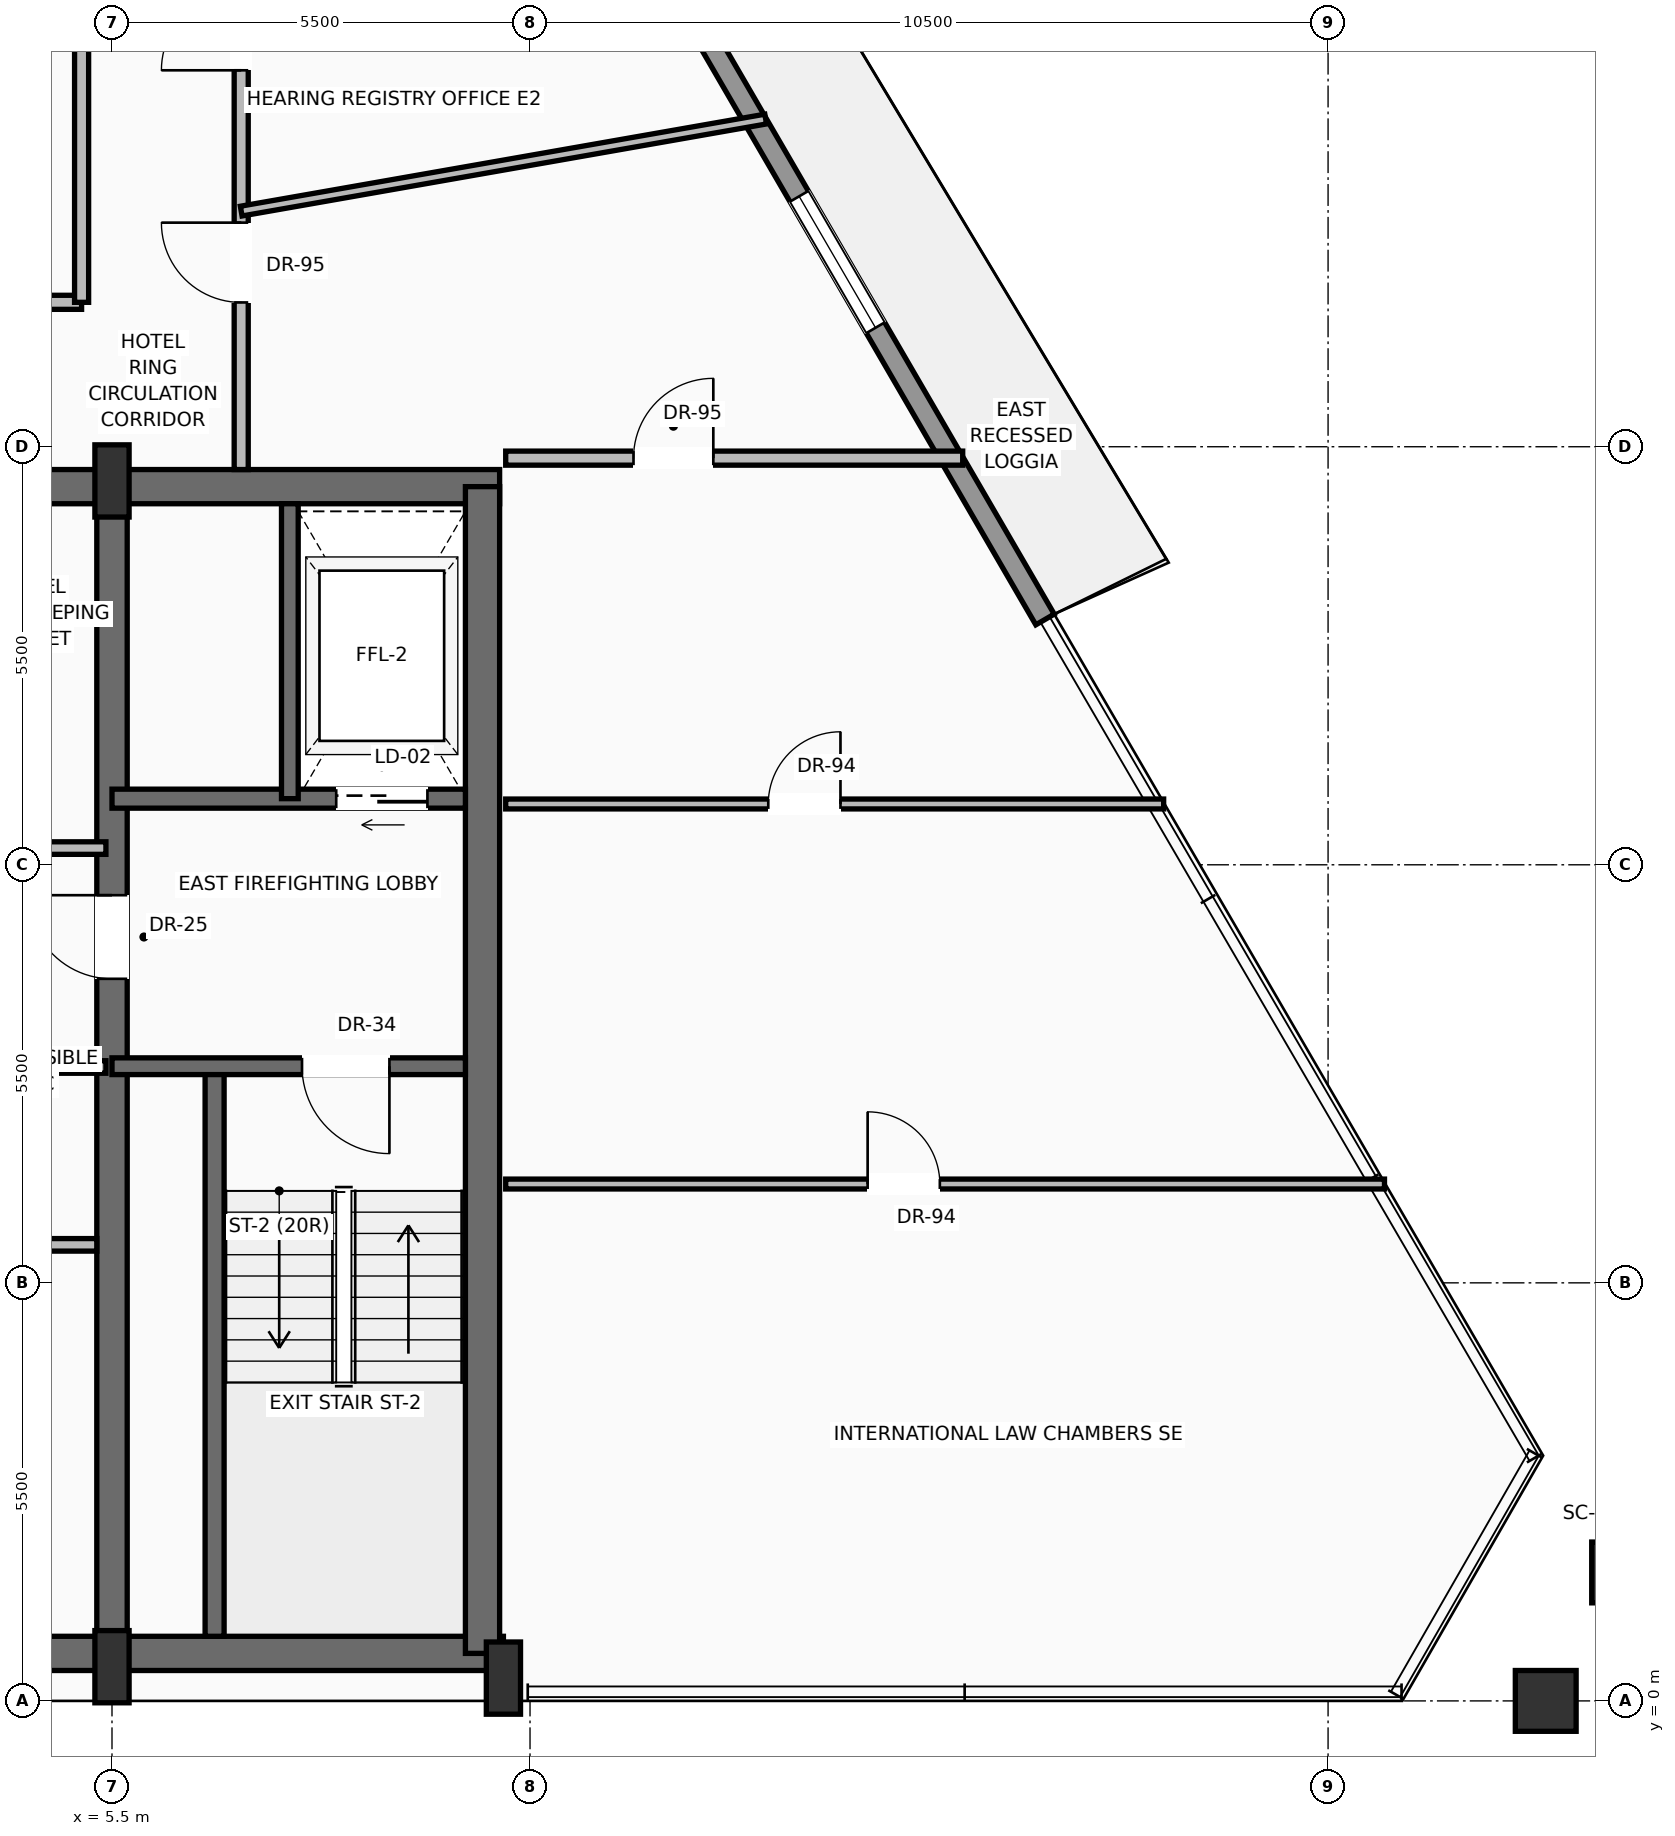
"""IFC4 building model, lengths in metres.
Left out: names, types, materials, properties, quantities, classifications, styles, units other than length and angle.
Written with IfcOpenShell. Run it as: python <this file> out.ifc"""

import sys

from ifc_helpers import new_model, si_unit, direction, frame, frame_2d, origin, origin_2d, place, context, subcontext, project, spatial, rectangle, hollow_rectangle, extrude, source, transform, mapped, element, fill, save


model = new_model("IFC4")
c1 = context("Model", 3, precision=1e-05, world=origin(), true_north=direction((0.0, 1.0)))
c2 = subcontext(c1, "Body", "Model", "MODEL_VIEW")
j1 = project(units=[si_unit("LENGTHUNIT", "METRE"), si_unit("PLANEANGLEUNIT", "RADIAN")], contexts=[c1])
p1 = place(None, origin())
s1 = spatial("IfcSite", under=j1, at=p1, CompositionType="ELEMENT")
p2 = place(p1, origin())
s2 = spatial("IfcBuilding", under=s1, at=p2, CompositionType="ELEMENT")
p3 = place(p2, frame((0.0, 0.0, 290.25)))
s3 = spatial("IfcBuildingStorey", under=s2, at=p3, CompositionType="ELEMENT", Elevation=290.25)
p4 = place(p3, frame((-10.65, 0.625, 0.0), z_axis=(0.0, 0.0, 1.0), x_axis=(1.0, 0.0, 0.0)))
e1 = element("IfcWall", 1, at=p4, inside=s3, PredefinedType="SHEAR", context=c2, shape_type="SweptSolid", body=[
    extrude(rectangle(XDim=21.3, YDim=0.45, at=frame_2d((10.65, 0.0))), origin(), (0.0, 0.0, 1.0), 3.24),
])
p5 = place(p3, frame((-10.6, 15.975, 0.0), z_axis=(0.0, 0.0, 1.0), x_axis=(1.0, 0.0, 0.0)))
e2 = element("IfcWall", 2, at=p5, inside=s3, PredefinedType="SHEAR", context=c2, shape_type="SweptSolid", body=[
    extrude(rectangle(XDim=21.2, YDim=0.45, at=frame_2d((10.6, 0.0))), origin(), (0.0, 0.0, 1.0), 3.24),
])
p6 = place(p5, frame((3.17, 0.0, 0.0)))
e3 = element("IfcOpeningElement", 3, at=p6, cuts=e2, PredefinedType="OPENING", context=c2, shape_type="SweptSolid", body=[
    extrude(rectangle(XDim=1.3, YDim=2.3, at=frame_2d((0.65, 1.15))), frame((0.0, 0.235, 0.0), z_axis=(0.0, -1.0, 0.0), x_axis=(1.0, 0.0, 0.0)), (0.0, 0.0, 1.0), 0.47),
])
p7 = place(p5, frame((9.6, 0.0, 0.0)))
e4 = element("IfcOpeningElement", 4, at=p7, cuts=e2, PredefinedType="OPENING", context=c2, shape_type="SweptSolid", body=[
    extrude(rectangle(XDim=2.0, YDim=2.4, at=frame_2d((1.0, 1.2))), frame((0.0, 0.235, 0.0), z_axis=(0.0, -1.0, 0.0), x_axis=(1.0, 0.0, 0.0)), (0.0, 0.0, 1.0), 0.47),
])
p8 = place(p3, frame((10.375, 0.625, 0.0), z_axis=(0.0, 0.0, 1.0), x_axis=(0.0, 1.0, 0.0)))
e5 = element("IfcWall", 5, at=p8, inside=s3, PredefinedType="SHEAR", context=c2, shape_type="SweptSolid", body=[
    extrude(rectangle(XDim=15.35, YDim=0.45, at=frame_2d((7.675, 0.0))), origin(), (0.0, 0.0, 1.0), 3.24),
])
p9 = place(p3, frame((5.5, 0.625, 0.0), z_axis=(0.0, 0.0, 1.0), x_axis=(0.0, 1.0, 0.0)))
e6 = element("IfcWall", 6, at=p9, inside=s3, PredefinedType="SHEAR", context=c2, shape_type="SweptSolid", body=[
    extrude(rectangle(XDim=15.35, YDim=0.4, at=frame_2d((7.675, 0.0))), origin(), (0.0, 0.0, 1.0), 3.24),
])
p10 = place(p9, frame((8.875, 0.0, 0.0)))
e7 = element("IfcOpeningElement", 7, at=p10, cuts=e6, PredefinedType="OPENING", context=c2, shape_type="SweptSolid", body=[
    extrude(rectangle(XDim=1.1, YDim=2.2, at=frame_2d((0.55, 1.1))), frame((0.0, 0.21, 0.0), z_axis=(0.0, -1.0, 0.0), x_axis=(1.0, 0.0, 0.0)), (0.0, 0.0, 1.0), 0.42),
])
m1 = source(origin(), c2, "Body", "SweptSolid", [
    extrude(rectangle(XDim=0.45, YDim=0.95, at=origin_2d()), origin(), (0.0, 0.0, 1.0), 3.45),
])
for number, where, z_axis, x_axis in (
    (8, (5.5, 0.45, 0.0), (0.0, 0.0, 1.0), (1.0, 0.0, 0.0)),
    (9, (10.65, 0.3, 0.0), (0.0, 0.0, 1.0), (1.0, 0.0, 0.0)),
    (10, (5.5, 16.05, 0.0), (0.0, 0.0, 1.0), (1.0, 0.0, 0.0)),
):
    element("IfcColumn", number, at=place(p3, frame(where, z_axis=z_axis, x_axis=x_axis)), inside=s3, PredefinedType="PILASTER", context=c2, shape_type="MappedRepresentation", body=[
        mapped(m1, transform((0.0, 0.0, 0.0), scale=1.0)),
    ])
m2 = source(origin(), c2, "Body", "SweptSolid", [
    extrude(hollow_rectangle(XDim=0.8, YDim=0.8, WallThickness=0.04, at=origin_2d()), origin(), (0.0, 0.0, 1.0), 3.441),
])
p11 = place(p3, frame((24.364, 0.0, 0.004), z_axis=(-0.004256790095, 0.0, 0.999990939828), x_axis=(0.0, -1.0, 0.0)))
e11 = element("IfcColumn", 11, at=p11, inside=s3, PredefinedType="COLUMN", context=c2, shape_type="MappedRepresentation", body=[
    mapped(m2, transform((0.0, 0.0, 0.0), scale=1.0)),
])
m3 = source(origin(), c2, "Body", "SweptSolid", [
    extrude(hollow_rectangle(XDim=0.8, YDim=0.8, WallThickness=0.04, at=origin_2d()), origin(), (0.0, 0.0, 1.0), 3.442),
])
p12 = place(p3, frame((25.369, 1.69, 0.004), z_axis=(-0.013618989325, -0.015321362991, 0.999789867405), x_axis=(0.747409318684, -0.66436383883, 0.0)))
e12 = element("IfcColumn", 12, at=p12, inside=s3, PredefinedType="COLUMN", context=c2, shape_type="MappedRepresentation", body=[
    mapped(m3, transform((0.0, 0.0, 0.0), scale=1.0)),
])
p13 = place(p3, frame((7.667, 31.624, 0.0), z_axis=(0.0, 0.0, 1.0), x_axis=(0.5024293772, -0.864618251558, 0.0)))
e13 = element("IfcWall", 13, at=p13, inside=s3, PredefinedType="SOLIDWALL", context=c2, shape_type="SweptSolid", body=[
    extrude(rectangle(XDim=20.121, YDim=0.28, at=frame_2d((10.061, 0.0))), origin(), (0.0, 0.0, 1.0), 2.82),
])
p14 = place(p13, frame((4.829, 0.0, 0.0)))
e14 = element("IfcOpeningElement", 14, at=p14, cuts=e13, PredefinedType="OPENING", context=c2, shape_type="SweptSolid", body=[
    extrude(rectangle(XDim=1.6, YDim=2.35, at=frame_2d((0.8, 1.175))), frame((0.0, 0.15, 0.0), z_axis=(0.0, -1.0, 0.0), x_axis=(1.0, 0.0, 0.0)), (0.0, 0.0, 1.0), 0.3),
])
p15 = place(p13, frame((13.682, 0.0, 0.9)))
e15 = element("IfcOpeningElement", 15, at=p15, cuts=e13, PredefinedType="OPENING", context=c2, shape_type="SweptSolid", body=[
    extrude(rectangle(XDim=2.0, YDim=1.75, at=frame_2d((1.0, 0.875))), frame((0.0, 0.15, 0.0), z_axis=(0.0, -1.0, 0.0), x_axis=(1.0, 0.0, 0.0)), (0.0, 0.0, 1.0), 0.3),
])
p16 = place(p3, frame((6.85, 0.85, 0.0), z_axis=(0.0, 0.0, 1.0), x_axis=(0.0, 1.0, 0.0)))
e16 = element("IfcWall", 16, at=p16, inside=s3, PredefinedType="SOLIDWALL", context=c2, shape_type="SweptSolid", body=[
    extrude(rectangle(XDim=7.5, YDim=0.25, at=frame_2d((3.75, 0.0))), origin(), (0.0, 0.0, 1.0), 3.24),
])
p17 = place(p3, frame((10.15, 8.35, 0.0), z_axis=(0.0, 0.0, 1.0), x_axis=(-1.0, 0.0, 0.0)))
e17 = element("IfcWall", 17, at=p17, inside=s3, PredefinedType="SOLIDWALL", context=c2, shape_type="SweptSolid", body=[
    extrude(rectangle(XDim=4.65, YDim=0.22, at=frame_2d((2.325, 0.0))), origin(), (0.0, 0.0, 1.0), 3.24),
])
p18 = place(p17, frame((1.0, 0.0, 0.0)))
e18 = element("IfcOpeningElement", 18, at=p18, cuts=e17, PredefinedType="OPENING", context=c2, shape_type="SweptSolid", body=[
    extrude(rectangle(XDim=1.15, YDim=2.2, at=frame_2d((0.575, 1.1))), frame((0.0, 0.12, 0.0), z_axis=(0.0, -1.0, 0.0), x_axis=(1.0, 0.0, 0.0)), (0.0, 0.0, 1.0), 0.24),
])
p19 = place(p3, frame((10.15, 11.87, 0.0), z_axis=(0.0, 0.0, 1.0), x_axis=(-1.0, 0.0, 0.0)))
e19 = element("IfcWall", 19, at=p19, inside=s3, PredefinedType="SOLIDWALL", context=c2, shape_type="SweptSolid", body=[
    extrude(rectangle(XDim=4.65, YDim=0.25, at=frame_2d((2.325, 0.0))), origin(), (0.0, 0.0, 1.0), 3.24),
])
p20 = place(p19, frame((0.5, 0.0, 0.0)))
e20 = element("IfcOpeningElement", 20, at=p20, cuts=e19, PredefinedType="OPENING", context=c2, shape_type="SweptSolid", body=[
    extrude(rectangle(XDim=1.2, YDim=2.25, at=frame_2d((0.6, 1.125))), frame((0.0, 0.135, 0.0), z_axis=(0.0, -1.0, 0.0), x_axis=(1.0, 0.0, 0.0)), (0.0, 0.0, 1.0), 0.27),
])
p21 = place(p3, frame((7.84, 11.87, 0.0), z_axis=(0.0, 0.0, 1.0), x_axis=(0.0, 1.0, 0.0)))
e21 = element("IfcWall", 21, at=p21, inside=s3, PredefinedType="SOLIDWALL", context=c2, shape_type="SweptSolid", body=[
    extrude(rectangle(XDim=3.88, YDim=0.22, at=frame_2d((1.94, 0.0))), origin(), (0.0, 0.0, 1.0), 3.24),
])
p22 = place(p3, frame((-5.5, 6.0, 0.0), z_axis=(0.0, 0.0, 1.0), x_axis=(1.0, 0.0, 0.0)))
e22 = element("IfcWall", 22, at=p22, inside=s3, PredefinedType="PARTITIONING", context=c2, shape_type="SweptSolid", body=[
    extrude(rectangle(XDim=10.8, YDim=0.165, at=frame_2d((5.4, 0.0))), origin(), (0.0, 0.0, 1.0), 3.232),
])
p23 = place(p22, frame((7.7, 0.0, 0.0)))
e23 = element("IfcOpeningElement", 23, at=p23, cuts=e22, PredefinedType="OPENING", context=c2, shape_type="SweptSolid", body=[
    extrude(rectangle(XDim=0.9, YDim=2.1, at=frame_2d((0.45, 1.05))), frame((0.0, 0.093, 0.0), z_axis=(0.0, -1.0, 0.0), x_axis=(1.0, 0.0, 0.0)), (0.0, 0.0, 1.0), 0.185),
])
for number, where, z_axis, x_axis in (
    (24, (3.54, 8.34, 0.0), (0.0, 0.0, 1.0), (1.0, 0.0, 0.0)),
    (25, (3.54, 11.22, 0.0), (0.0, 0.0, 1.0), (1.0, 0.0, 0.0)),
):
    element("IfcWall", number, at=place(p3, frame(where, z_axis=z_axis, x_axis=x_axis)), inside=s3, PredefinedType="PARTITIONING", context=c2, shape_type="SweptSolid", body=[
        extrude(rectangle(XDim=1.88, YDim=0.165, at=frame_2d((0.94, 0.0))), origin(), (0.0, 0.0, 1.0), 3.232),
    ])
p24 = place(p3, frame((-5.1, 18.4, 0.0), z_axis=(0.0, 0.0, 1.0), x_axis=(1.0, 0.0, 0.0)))
e26 = element("IfcWall", 26, at=p24, inside=s3, PredefinedType="PARTITIONING", context=c2, shape_type="SweptSolid", body=[
    extrude(rectangle(XDim=10.2, YDim=0.185, at=frame_2d((5.1, 0.0))), origin(), (0.0, 0.0, 1.0), 3.232),
])
p25 = place(p24, frame((4.625, 0.0, 0.0)))
e27 = element("IfcOpeningElement", 27, at=p25, cuts=e26, PredefinedType="OPENING", context=c2, shape_type="SweptSolid", body=[
    extrude(rectangle(XDim=0.95, YDim=2.2, at=frame_2d((0.475, 1.1))), frame((0.0, 0.103, 0.0), z_axis=(0.0, -1.0, 0.0), x_axis=(1.0, 0.0, 0.0)), (0.0, 0.0, 1.0), 0.205),
])
p26 = place(p3, frame((5.1, 18.4, 0.0), z_axis=(0.0, 0.0, 1.0), x_axis=(0.0, 1.0, 0.0)))
e28 = element("IfcWall", 28, at=p26, inside=s3, PredefinedType="PARTITIONING", context=c2, shape_type="SweptSolid", body=[
    extrude(rectangle(XDim=6.1, YDim=0.185, at=frame_2d((3.05, 0.0))), origin(), (0.0, 0.0, 1.0), 3.232),
])
p27 = place(p3, frame((7.2, 16.2, 0.0), z_axis=(0.0, 0.0, 1.0), x_axis=(0.0, 1.0, 0.0)))
e29 = element("IfcWall", 29, at=p27, inside=s3, PredefinedType="PARTITIONING", context=c2, shape_type="SweptSolid", body=[
    extrude(rectangle(XDim=10.4, YDim=0.185, at=frame_2d((5.2, 0.0))), origin(), (0.0, 0.0, 1.0), 3.232),
])
p28 = place(p27, frame((2.198, 0.0, 0.0)))
e30 = element("IfcOpeningElement", 30, at=p28, cuts=e29, PredefinedType="OPENING", context=c2, shape_type="SweptSolid", body=[
    extrude(rectangle(XDim=1.05, YDim=2.25, at=frame_2d((0.525, 1.125))), frame((0.0, 0.103, 0.0), z_axis=(0.0, -1.0, 0.0), x_axis=(1.0, 0.0, 0.0)), (0.0, 0.0, 1.0), 0.205),
])
p29 = place(p27, frame((5.252, 0.0, 0.0)))
e31 = element("IfcOpeningElement", 31, at=p29, cuts=e29, PredefinedType="OPENING", context=c2, shape_type="SweptSolid", body=[
    extrude(rectangle(XDim=1.05, YDim=2.25, at=frame_2d((0.525, 1.125))), frame((0.0, 0.103, 0.0), z_axis=(0.0, -1.0, 0.0), x_axis=(1.0, 0.0, 0.0)), (0.0, 0.0, 1.0), 0.205),
])
p30 = place(p27, frame((8.369, 0.0, 0.0)))
e32 = element("IfcOpeningElement", 32, at=p30, cuts=e29, PredefinedType="OPENING", context=c2, shape_type="SweptSolid", body=[
    extrude(rectangle(XDim=1.05, YDim=2.25, at=frame_2d((0.525, 1.125))), frame((0.0, 0.103, 0.0), z_axis=(0.0, -1.0, 0.0), x_axis=(1.0, 0.0, 0.0)), (0.0, 0.0, 1.0), 0.205),
])
p31 = place(p3, frame((10.68, 16.35, 0.0), z_axis=(0.0, 0.0, 1.0), x_axis=(1.0, 0.0, 0.0)))
e33 = element("IfcWall", 33, at=p31, inside=s3, PredefinedType="PARTITIONING", context=c2, shape_type="SweptSolid", body=[
    extrude(rectangle(XDim=6.013, YDim=0.185, at=frame_2d((3.006, 0.0))), origin(), (0.0, 0.0, 1.0), 3.232),
])
p32 = place(p31, frame((1.681, 0.0, 0.0)))
e34 = element("IfcOpeningElement", 34, at=p32, cuts=e33, PredefinedType="OPENING", context=c2, shape_type="SweptSolid", body=[
    extrude(rectangle(XDim=1.05, YDim=2.25, at=frame_2d((0.525, 1.125))), frame((0.0, 0.103, 0.0), z_axis=(0.0, -1.0, 0.0), x_axis=(1.0, 0.0, 0.0)), (0.0, 0.0, 1.0), 0.205),
])
p33 = place(p3, frame((10.68, 6.8, 0.0), z_axis=(0.0, 0.0, 1.0), x_axis=(1.0, 0.0, 0.0)))
e35 = element("IfcWall", 35, at=p33, inside=s3, PredefinedType="PARTITIONING", context=c2, shape_type="SweptSolid", body=[
    extrude(rectangle(XDim=11.562, YDim=0.13, at=frame_2d((5.781, 0.0))), origin(), (0.0, 0.0, 1.0), 3.232),
])
p34 = place(p33, frame((4.762, 0.0, 0.0)))
e36 = element("IfcOpeningElement", 36, at=p34, cuts=e35, PredefinedType="OPENING", context=c2, shape_type="SweptSolid", body=[
    extrude(rectangle(XDim=0.95, YDim=2.2, at=frame_2d((0.475, 1.1))), frame((0.0, 0.075, 0.0), z_axis=(0.0, -1.0, 0.0), x_axis=(1.0, 0.0, 0.0)), (0.0, 0.0, 1.0), 0.15),
])
p35 = place(p3, frame((10.68, 11.8, 0.0), z_axis=(0.0, 0.0, 1.0), x_axis=(1.0, 0.0, 0.0)))
e37 = element("IfcWall", 37, at=p35, inside=s3, PredefinedType="PARTITIONING", context=c2, shape_type="SweptSolid", body=[
    extrude(rectangle(XDim=8.657, YDim=0.13, at=frame_2d((4.329, 0.0))), origin(), (0.0, 0.0, 1.0), 3.232),
])
p36 = place(p35, frame((3.455, 0.0, 0.0)))
e38 = element("IfcOpeningElement", 38, at=p36, cuts=e37, PredefinedType="OPENING", context=c2, shape_type="SweptSolid", body=[
    extrude(rectangle(XDim=0.95, YDim=2.2, at=frame_2d((0.475, 1.1))), frame((0.0, 0.075, 0.0), z_axis=(0.0, -1.0, 0.0), x_axis=(1.0, 0.0, 0.0)), (0.0, 0.0, 1.0), 0.15),
])
p37 = place(p3, frame((7.2, 19.6, 0.0), z_axis=(0.0, 0.0, 1.0), x_axis=(0.984955671934, 0.172807188294, 0.0)))
e39 = element("IfcWall", 39, at=p37, inside=s3, PredefinedType="PARTITIONING", context=c2, shape_type="SweptSolid", body=[
    extrude(rectangle(XDim=7.006, YDim=0.13, at=frame_2d((3.503, 0.0))), origin(), (0.0, 0.0, 1.0), 2.885),
])
m4 = source(origin(), c2, "Body", "SweptSolid", [
    extrude(rectangle(XDim=2.0, YDim=1.75, at=frame_2d((1.0, 0.875))), frame((0.0, 0.03, 0.0), z_axis=(0.0, -1.0, 0.0), x_axis=(1.0, 0.0, 0.0)), (0.0, 0.0, 1.0), 0.06),
])
p38 = place(p15, origin())
e40 = element("IfcWindow", 40, at=p38, inside=s3, PartitioningType="SINGLE_PANEL", PredefinedType="WINDOW", context=c2, shape_type="MappedRepresentation", body=[
    mapped(m4, transform((0.0, 0.0, 0.0), scale=1.0)),
])
fill(e15, e40)
m5 = source(origin(), c2, "Body", "SweptSolid", [
    extrude(rectangle(XDim=1.15, YDim=2.2, at=frame_2d((0.575, 1.1))), frame((0.0, 0.025, 0.0), z_axis=(0.0, -1.0, 0.0), x_axis=(1.0, 0.0, 0.0)), (0.0, 0.0, 1.0), 0.05),
])
p39 = place(p18, origin())
e41 = element("IfcDoor", 41, at=p39, inside=s3, OperationType="SINGLE_SWING_LEFT", PredefinedType="DOOR", context=c2, shape_type="MappedRepresentation", body=[
    mapped(m5, transform((0.0, 0.0, 0.0), scale=1.0)),
])
fill(e18, e41)
m6 = source(origin(), c2, "Body", "SweptSolid", [
    extrude(rectangle(XDim=1.1, YDim=2.2, at=frame_2d((0.55, 1.1))), frame((0.0, 0.025, 0.0), z_axis=(0.0, -1.0, 0.0), x_axis=(1.0, 0.0, 0.0)), (0.0, 0.0, 1.0), 0.05),
])
p40 = place(p10, origin())
e42 = element("IfcDoor", 42, at=p40, inside=s3, OperationType="SINGLE_SWING_RIGHT", PredefinedType="DOOR", context=c2, shape_type="MappedRepresentation", body=[
    mapped(m6, transform((0.0, 0.0, 0.0), scale=1.0)),
])
fill(e7, e42)
m7 = source(origin(), c2, "Body", "SweptSolid", [
    extrude(rectangle(XDim=1.2, YDim=2.25, at=frame_2d((0.6, 1.125))), frame((0.0, 0.025, 0.0), z_axis=(0.0, -1.0, 0.0), x_axis=(1.0, 0.0, 0.0)), (0.0, 0.0, 1.0), 0.05),
])
p41 = place(p20, origin())
e43 = element("IfcDoor", 43, at=p41, inside=s3, OperationType="SLIDING_TO_RIGHT", PredefinedType="DOOR", context=c2, shape_type="MappedRepresentation", body=[
    mapped(m7, transform((0.0, 0.0, 0.0), scale=1.0)),
])
fill(e20, e43)
m8 = source(origin(), c2, "Body", "SweptSolid", [
    extrude(rectangle(XDim=1.05, YDim=2.25, at=frame_2d((0.525, 1.125))), frame((0.0, 0.025, 0.0), z_axis=(0.0, -1.0, 0.0), x_axis=(1.0, 0.0, 0.0)), (0.0, 0.0, 1.0), 0.05),
])
p42 = place(p32, origin())
e44 = element("IfcDoor", 44, at=p42, inside=s3, OperationType="SINGLE_SWING_RIGHT", PredefinedType="DOOR", context=c2, shape_type="MappedRepresentation", body=[
    mapped(m8, transform((0.0, 0.0, 0.0), scale=1.0)),
])
fill(e34, e44)
m9 = source(origin(), c2, "Body", "SweptSolid", [
    extrude(rectangle(XDim=0.95, YDim=2.2, at=frame_2d((0.475, 1.1))), frame((0.0, 0.025, 0.0), z_axis=(0.0, -1.0, 0.0), x_axis=(1.0, 0.0, 0.0)), (0.0, 0.0, 1.0), 0.05),
])
p43 = place(p34, origin())
e45 = element("IfcDoor", 45, at=p43, inside=s3, OperationType="SINGLE_SWING_LEFT", PredefinedType="DOOR", context=c2, shape_type="MappedRepresentation", body=[
    mapped(m9, transform((0.0, 0.0, 0.0), scale=1.0)),
])
fill(e36, e45)
p44 = place(p36, origin())
e46 = element("IfcDoor", 46, at=p44, inside=s3, OperationType="SINGLE_SWING_RIGHT", PredefinedType="DOOR", context=c2, shape_type="MappedRepresentation", body=[
    mapped(m9, transform((0.0, 0.0, 0.0), scale=1.0)),
])
fill(e38, e46)
p45 = place(p28, origin())
e47 = element("IfcDoor", 47, at=p45, inside=s3, OperationType="SINGLE_SWING_RIGHT", PredefinedType="DOOR", context=c2, shape_type="MappedRepresentation", body=[
    mapped(m8, transform((0.0, 0.0, 0.0), scale=1.0)),
])
fill(e30, e47)
p46 = place(p29, origin())
e48 = element("IfcDoor", 48, at=p46, inside=s3, OperationType="SINGLE_SWING_LEFT", PredefinedType="DOOR", context=c2, shape_type="MappedRepresentation", body=[
    mapped(m8, transform((0.0, 0.0, 0.0), scale=1.0)),
])
fill(e31, e48)
save(model, sys.argv[1])
